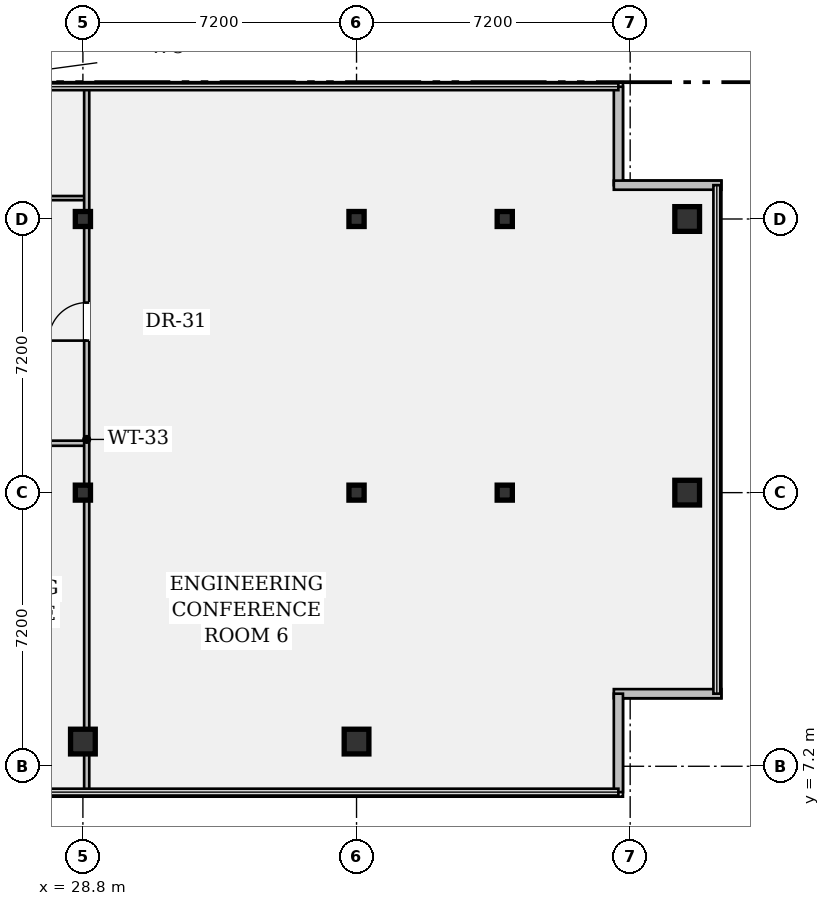
"""IFC4 building model, lengths in metres.
Left out: names, types, materials, properties, quantities, classifications, styles, units other than length and angle.
Written with IfcOpenShell. Run it as: python <this file> out.ifc"""

import sys

from ifc_helpers import new_model, si_unit, direction, frame, frame_2d, origin, origin_2d, place, context, subcontext, project, spatial, rectangle, hollow_rectangle, i_section, extrude, element, fill, save


model = new_model("IFC4")
c1 = context("Model", 3, precision=1e-05, world=origin(), true_north=direction((0.0, 1.0)))
c2 = subcontext(c1, "Body", "Model", "MODEL_VIEW")
j1 = project(units=[si_unit("LENGTHUNIT", "METRE"), si_unit("PLANEANGLEUNIT", "RADIAN")], contexts=[c1])
p1 = place(None, origin())
s1 = spatial("IfcSite", under=j1, at=p1, CompositionType="ELEMENT")
p2 = place(p1, origin())
s2 = spatial("IfcBuilding", under=s1, at=p2, CompositionType="ELEMENT")
p3 = place(p2, frame((0.0, 0.0, 262.15)))
s3 = spatial("IfcBuildingStorey", under=s2, at=p3, CompositionType="ELEMENT", Elevation=262.15)
p4 = place(p3, frame((28.8, 7.85, 0.0), z_axis=(0.0, 0.0, 1.0), x_axis=(1.0, 0.0, 0.0)))
e1 = element("IfcColumn", 1, at=p4, inside=s3, PredefinedType="COLUMN", context=c2, shape_type="SweptSolid", body=[
    extrude(hollow_rectangle(XDim=0.65, YDim=0.65, WallThickness=0.04, at=origin_2d()), origin(), (0.0, 0.0, 1.0), 3.24),
])
for number, where, z_axis, x_axis in (
    (2, (28.8, 14.4, 0.0), (0.0, 0.0, 1.0), (1.0, 0.0, 0.0)),
    (3, (28.8, 21.6, 0.0), (0.0, 0.0, 1.0), (1.0, 0.0, 0.0)),
):
    element("IfcColumn", number, at=place(p3, frame(where, z_axis=z_axis, x_axis=x_axis)), inside=s3, PredefinedType="COLUMN", context=c2, shape_type="SweptSolid", body=[
        extrude(i_section(OverallWidth=0.399, OverallDepth=0.394, WebThickness=0.023, FlangeThickness=0.037, FilletRadius=0.018, at=origin_2d()), origin(), (0.0, 0.0, 1.0), 3.24),
    ])
p5 = place(p3, frame((36.0, 7.85, 0.0), z_axis=(0.0, 0.0, 1.0), x_axis=(1.0, 0.0, 0.0)))
e4 = element("IfcColumn", 4, at=p5, inside=s3, PredefinedType="COLUMN", context=c2, shape_type="SweptSolid", body=[
    extrude(hollow_rectangle(XDim=0.65, YDim=0.65, WallThickness=0.04, at=origin_2d()), origin(), (0.0, 0.0, 1.0), 3.24),
])
for number, where, z_axis, x_axis in (
    (5, (36.0, 14.4, 0.0), (0.0, 0.0, 1.0), (1.0, 0.0, 0.0)),
    (6, (36.0, 21.6, 0.0), (0.0, 0.0, 1.0), (1.0, 0.0, 0.0)),
    (7, (39.9, 14.4, 0.0), (0.0, 0.0, 1.0), (1.0, 0.0, 0.0)),
    (8, (39.9, 21.6, 0.0), (0.0, 0.0, 1.0), (1.0, 0.0, 0.0)),
):
    element("IfcColumn", number, at=place(p3, frame(where, z_axis=z_axis, x_axis=x_axis)), inside=s3, PredefinedType="COLUMN", context=c2, shape_type="SweptSolid", body=[
        extrude(i_section(OverallWidth=0.399, OverallDepth=0.394, WebThickness=0.023, FlangeThickness=0.037, FilletRadius=0.018, at=origin_2d()), origin(), (0.0, 0.0, 1.0), 3.24),
    ])
for number, where, z_axis, x_axis in (
    (9, (44.7, 14.4, 0.0), (0.0, 0.0, 1.0), (1.0, 0.0, 0.0)),
    (10, (44.7, 21.6, 0.0), (0.0, 0.0, 1.0), (1.0, 0.0, 0.0)),
):
    element("IfcColumn", number, at=place(p3, frame(where, z_axis=z_axis, x_axis=x_axis)), inside=s3, PredefinedType="COLUMN", context=c2, shape_type="SweptSolid", body=[
        extrude(hollow_rectangle(XDim=0.65, YDim=0.65, WallThickness=0.04, at=origin_2d()), origin(), (0.0, 0.0, 1.0), 3.24),
    ])
p6 = place(p3, frame((42.89, 25.08, 0.0), z_axis=(0.0, 0.0, 1.0), x_axis=(0.0, -1.0, 0.0)))
e11 = element("IfcWall", 11, at=p6, inside=s3, PredefinedType="STANDARD", context=c2, shape_type="SweptSolid", body=[
    extrude(rectangle(XDim=2.59, YDim=0.24, at=frame_2d((1.295, 0.0))), origin(), (0.0, 0.0, 1.0), 3.24),
])
for number, where, z_axis, x_axis in (
    (12, (42.77, 22.49, 0.0), (0.0, 0.0, 1.0), (1.0, 0.0, 0.0)),
    (13, (45.6, 9.11, 0.0), (0.0, 0.0, 1.0), (-1.0, 0.0, 0.0)),
):
    element("IfcWall", number, at=place(p3, frame(where, z_axis=z_axis, x_axis=x_axis)), inside=s3, PredefinedType="STANDARD", context=c2, shape_type="SweptSolid", body=[
        extrude(rectangle(XDim=2.83, YDim=0.24, at=frame_2d((1.415, 0.0))), origin(), (0.0, 0.0, 1.0), 3.24),
    ])
p7 = place(p3, frame((42.89, 9.11, 0.0), z_axis=(0.0, 0.0, 1.0), x_axis=(0.0, -1.0, 0.0)))
e14 = element("IfcWall", 14, at=p7, inside=s3, PredefinedType="STANDARD", context=c2, shape_type="SweptSolid", body=[
    extrude(rectangle(XDim=2.59, YDim=0.24, at=frame_2d((1.295, 0.0))), origin(), (0.0, 0.0, 1.0), 3.24),
])
p8 = place(p3, frame((26.95, 15.7, 0.0), z_axis=(0.0, 0.0, 1.0), x_axis=(1.0, 0.0, 0.0)))
e15 = element("IfcWall", 15, at=p8, inside=s3, PredefinedType="PARTITIONING", context=c2, shape_type="SweptSolid", body=[
    extrude(rectangle(XDim=1.95, YDim=0.135, at=frame_2d((0.975, 0.0))), origin(), (0.0, 0.0, 1.0), 2.676),
])
p9 = place(p3, frame((26.95, 22.15, 0.0), z_axis=(0.0, 0.0, 1.0), x_axis=(1.0, 0.0, 0.0)))
e16 = element("IfcWall", 16, at=p9, inside=s3, PredefinedType="PARTITIONING", context=c2, shape_type="SweptSolid", body=[
    extrude(rectangle(XDim=1.95, YDim=0.11, at=frame_2d((0.975, 0.0))), origin(), (0.0, 0.0, 1.0), 3.24),
])
p10 = place(p3, frame((28.9, 6.52, 0.0), z_axis=(0.0, 0.0, 1.0), x_axis=(0.0, 1.0, 0.0)))
e17 = element("IfcWall", 17, at=p10, inside=s3, PredefinedType="PARTITIONING", context=c2, shape_type="SweptSolid", body=[
    extrude(rectangle(XDim=18.56, YDim=0.135, at=frame_2d((9.28, 0.0))), origin(), (0.0, 0.0, 1.0), 2.676),
])
p11 = place(p10, frame((11.88, 0.0, 0.0)))
e18 = element("IfcOpeningElement", 18, at=p11, cuts=e17, PredefinedType="OPENING", context=c2, shape_type="SweptSolid", body=[
    extrude(rectangle(XDim=1.0, YDim=2.15, at=frame_2d((0.5, 1.075))), frame((0.0, 0.08, 0.0), z_axis=(0.0, -1.0, 0.0), x_axis=(1.0, 0.0, 0.0)), (0.0, 0.0, 1.0), 0.159),
])
p12 = place(p11, origin())
e19 = element("IfcDoor", 19, at=p12, inside=s3, OperationType="SINGLE_SWING_LEFT", PredefinedType="DOOR", context=c2, shape_type="SweptSolid", body=[
    extrude(rectangle(XDim=1.0, YDim=2.15, at=frame_2d((0.5, 1.075))), frame((0.0, 0.025, 0.0), z_axis=(0.0, -1.0, 0.0), x_axis=(1.0, 0.0, 0.0)), (0.0, 0.0, 1.0), 0.05),
])
fill(e18, e19)
save(model, sys.argv[1])
